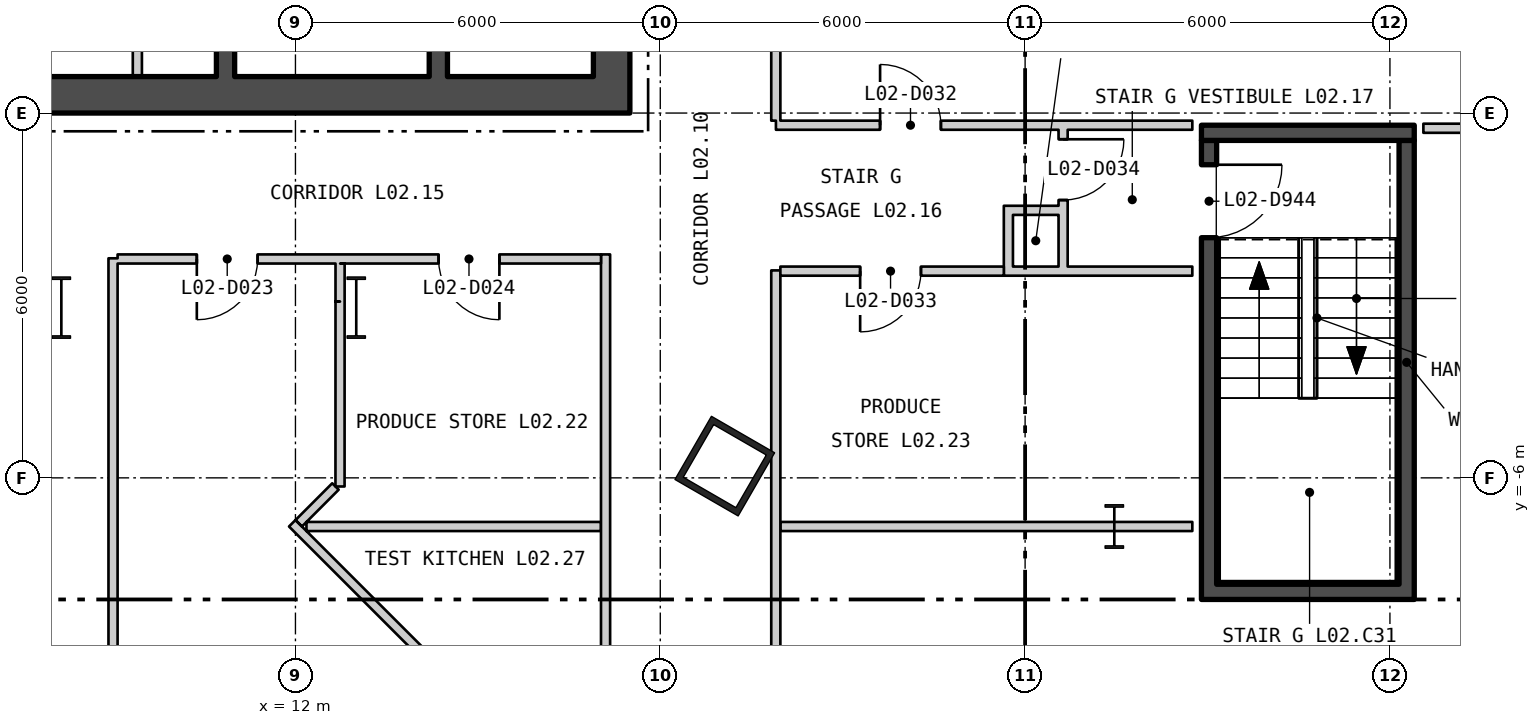
"""IFC4 building model, lengths in metres.
Left out: names, types, materials, properties, quantities, classifications, styles, units other than length and angle.
Written with IfcOpenShell. Run it as: python <this file> out.ifc"""

import sys

from ifc_helpers import new_model, si_unit, direction, frame, frame_2d, origin, origin_2d, place, context, subcontext, project, spatial, rectangle, hollow_rectangle, i_section, extrude, element, fill, save


model = new_model("IFC4")
c1 = context("Model", 3, precision=1e-05, world=origin(), true_north=direction((0.0, 1.0)))
c2 = subcontext(c1, "Body", "Model", "MODEL_VIEW")
j1 = project(units=[si_unit("LENGTHUNIT", "METRE"), si_unit("PLANEANGLEUNIT", "RADIAN")], contexts=[c1])
p1 = place(None, origin())
s1 = spatial("IfcSite", under=j1, at=p1, CompositionType="ELEMENT")
p2 = place(p1, origin())
s2 = spatial("IfcBuilding", under=s1, at=p2, CompositionType="ELEMENT")
p3 = place(p2, frame((0.0, 0.0, 13.5)))
s3 = spatial("IfcBuildingStorey", under=s2, at=p3, CompositionType="ELEMENT", Elevation=13.5)
p4 = place(p3, frame((19.061, -5.807, 0.0), z_axis=(0.0, 0.0, 1.0), x_axis=(0.5, 0.866025403784, 0.0)))
e1 = element("IfcColumn", 1, at=p4, inside=s3, PredefinedType="COLUMN", context=c2, shape_type="SweptSolid", body=[
    extrude(hollow_rectangle(XDim=1.2, YDim=1.2, WallThickness=0.1, at=origin_2d()), origin(), (0.0, 0.0, 1.0), 5.1),
])
for number, where, z_axis, x_axis in (
    (2, (8.15, -3.2, 0.0), (0.0, 0.0, 1.0), (1.0, 0.0, 0.0)),
    (3, (13.0, -3.2, 0.0), (0.0, 0.0, 1.0), (1.0, 0.0, 0.0)),
):
    element("IfcColumn", number, at=place(p3, frame(where, z_axis=z_axis, x_axis=x_axis)), inside=s3, PredefinedType="COLUMN", context=c2, shape_type="SweptSolid", body=[
        extrude(i_section(OverallWidth=0.302, OverallDepth=1.008, WebThickness=0.021, FlangeThickness=0.04, at=origin_2d()), origin(), (0.0, 0.0, 1.0), 5.1),
    ])
p5 = place(p3, frame((25.467, -6.8, 0.0), z_axis=(0.0, 0.0, 1.0), x_axis=(1.0, 0.0, 0.0)))
e4 = element("IfcColumn", 4, at=p5, inside=s3, PredefinedType="COLUMN", context=c2, shape_type="SweptSolid", body=[
    extrude(i_section(OverallWidth=0.304, OverallDepth=0.716, WebThickness=0.021, FlangeThickness=0.04, at=origin_2d()), origin(), (0.0, 0.0, 1.0), 5.1),
])
p6 = place(p3, frame((-17.5, 0.3, 0.0), z_axis=(0.0, 0.0, 1.0), x_axis=(1.0, 0.0, 0.0)))
e5 = element("IfcWall", 5, at=p6, inside=s3, PredefinedType="SHEAR", context=c2, shape_type="SweptSolid", body=[
    extrude(rectangle(XDim=35.0, YDim=0.6, at=frame_2d((17.5, 0.0))), origin(), (0.0, 0.0, 1.0), 4.88),
])
p7 = place(p6, frame((12.0, 0.0, 0.0)))
e6 = element("IfcOpeningElement", 6, at=p7, cuts=e5, PredefinedType="OPENING", context=c2, shape_type="SweptSolid", body=[
    extrude(rectangle(XDim=1.8, YDim=2.4, at=frame_2d((0.9, 1.2))), frame((0.0, 0.31, 0.0), z_axis=(0.0, -1.0, 0.0), x_axis=(1.0, 0.0, 0.0)), (0.0, 0.0, 1.0), 0.62),
])
p8 = place(p6, frame((22.0, 0.0, 0.0)))
e7 = element("IfcOpeningElement", 7, at=p8, cuts=e5, PredefinedType="OPENING", context=c2, shape_type="SweptSolid", body=[
    extrude(rectangle(XDim=1.8, YDim=2.4, at=frame_2d((0.9, 1.2))), frame((0.0, 0.31, 0.0), z_axis=(0.0, -1.0, 0.0), x_axis=(1.0, 0.0, 0.0)), (0.0, 0.0, 1.0), 0.62),
])
p9 = place(p3, frame((17.2, 0.6, 0.0), z_axis=(0.0, 0.0, 1.0), x_axis=(0.0, 1.0, 0.0)))
e8 = element("IfcWall", 8, at=p9, inside=s3, PredefinedType="SHEAR", context=c2, shape_type="SweptSolid", body=[
    extrude(rectangle(XDim=16.8, YDim=0.6, at=frame_2d((8.4, 0.0))), origin(), (0.0, 0.0, 1.0), 4.88),
])
p10 = place(p9, frame((5.7, 0.0, 0.0)))
e9 = element("IfcOpeningElement", 9, at=p10, cuts=e8, PredefinedType="OPENING", context=c2, shape_type="SweptSolid", body=[
    extrude(rectangle(XDim=1.5, YDim=2.1, at=frame_2d((0.75, 1.05))), frame((0.0, 0.31, 0.0), z_axis=(0.0, -1.0, 0.0), x_axis=(1.0, 0.0, 0.0)), (0.0, 0.0, 1.0), 0.62),
])
p11 = place(p9, frame((1.5, 0.0, 0.0)))
e10 = element("IfcOpeningElement", 10, at=p11, cuts=e8, PredefinedType="OPENING", context=c2, shape_type="SweptSolid", body=[
    extrude(rectangle(XDim=0.9, YDim=2.1, at=frame_2d((0.45, 1.05))), frame((0.0, 0.31, 0.0), z_axis=(0.0, -1.0, 0.0), x_axis=(1.0, 0.0, 0.0)), (0.0, 0.0, 1.0), 0.62),
])
p12 = place(p9, frame((4.3, 0.0, 0.0)))
e11 = element("IfcOpeningElement", 11, at=p12, cuts=e8, PredefinedType="OPENING", context=c2, shape_type="SweptSolid", body=[
    extrude(rectangle(XDim=1.0, YDim=2.1, at=frame_2d((0.5, 1.05))), frame((0.0, 0.31, 0.0), z_axis=(0.0, -1.0, 0.0), x_axis=(1.0, 0.0, 0.0)), (0.0, 0.0, 1.0), 0.62),
])
p13 = place(p9, frame((8.613, 0.0, 0.0)))
e12 = element("IfcOpeningElement", 12, at=p13, cuts=e8, PredefinedType="OPENING", context=c2, shape_type="SweptSolid", body=[
    extrude(rectangle(XDim=0.9, YDim=2.1, at=frame_2d((0.45, 1.05))), frame((0.0, 0.31, 0.0), z_axis=(0.0, -1.0, 0.0), x_axis=(1.0, 0.0, 0.0)), (0.0, 0.0, 1.0), 0.62),
])
p14 = place(p9, frame((13.413, 0.0, 0.0)))
e13 = element("IfcOpeningElement", 13, at=p14, cuts=e8, PredefinedType="OPENING", context=c2, shape_type="SweptSolid", body=[
    extrude(rectangle(XDim=0.9, YDim=2.1, at=frame_2d((0.45, 1.05))), frame((0.0, 0.31, 0.0), z_axis=(0.0, -1.0, 0.0), x_axis=(1.0, 0.0, 0.0)), (0.0, 0.0, 1.0), 0.62),
])
p15 = place(p3, frame((10.85, 0.6, 0.0), z_axis=(0.0, 0.0, 1.0), x_axis=(0.0, 1.0, 0.0)))
e14 = element("IfcWall", 14, at=p15, inside=s3, PredefinedType="SHEAR", context=c2, shape_type="SweptSolid", body=[
    extrude(rectangle(XDim=16.8, YDim=0.3, at=frame_2d((8.4, 0.0))), origin(), (0.0, 0.0, 1.0), 4.88),
])
p16 = place(p15, frame((5.075, 0.0, 0.0)))
e15 = element("IfcOpeningElement", 15, at=p16, cuts=e14, PredefinedType="OPENING", context=c2, shape_type="SweptSolid", body=[
    extrude(rectangle(XDim=1.25, YDim=2.1, at=frame_2d((0.625, 1.05))), frame((0.0, 0.16, 0.0), z_axis=(0.0, -1.0, 0.0), x_axis=(1.0, 0.0, 0.0)), (0.0, 0.0, 1.0), 0.32),
])
p17 = place(p15, frame((1.525, 0.0, 0.0)))
e16 = element("IfcOpeningElement", 16, at=p17, cuts=e14, PredefinedType="OPENING", context=c2, shape_type="SweptSolid", body=[
    extrude(rectangle(XDim=1.0, YDim=2.1, at=frame_2d((0.5, 1.05))), frame((0.0, 0.16, 0.0), z_axis=(0.0, -1.0, 0.0), x_axis=(1.0, 0.0, 0.0)), (0.0, 0.0, 1.0), 0.32),
])
p18 = place(p3, frame((14.35, 0.6, 0.0), z_axis=(0.0, 0.0, 1.0), x_axis=(0.0, 1.0, 0.0)))
e17 = element("IfcWall", 17, at=p18, inside=s3, PredefinedType="SHEAR", context=c2, shape_type="SweptSolid", body=[
    extrude(rectangle(XDim=16.8, YDim=0.3, at=frame_2d((8.4, 0.0))), origin(), (0.0, 0.0, 1.0), 4.88),
])
p19 = place(p18, frame((5.7, 0.0, 0.0)))
e18 = element("IfcOpeningElement", 18, at=p19, cuts=e17, PredefinedType="OPENING", context=c2, shape_type="SweptSolid", body=[
    extrude(rectangle(XDim=1.5, YDim=2.1, at=frame_2d((0.75, 1.05))), frame((0.0, 0.16, 0.0), z_axis=(0.0, -1.0, 0.0), x_axis=(1.0, 0.0, 0.0)), (0.0, 0.0, 1.0), 0.32),
])
p20 = place(p3, frame((9.4, 0.6, 0.0), z_axis=(0.0, 0.0, 1.0), x_axis=(0.0, 1.0, 0.0)))
e19 = element("IfcWall", 19, at=p20, inside=s3, PredefinedType="PARTITIONING", context=c2, shape_type="SweptSolid", body=[
    extrude(rectangle(XDim=3.275, YDim=0.15, at=frame_2d((1.637, 0.0))), origin(), (0.0, 0.0, 1.0), 4.88),
])
p21 = place(p3, frame((27.025, -7.75, 0.0), z_axis=(0.0, 0.0, 1.0), x_axis=(0.0, 1.0, 0.0)))
e20 = element("IfcWall", 20, at=p21, inside=s3, PredefinedType="SHEAR", context=c2, shape_type="SweptSolid", body=[
    extrude(rectangle(XDim=7.3, YDim=0.25, at=frame_2d((3.65, 0.0))), origin(), (0.0, 0.0, 1.0), 4.88),
])
p22 = place(p21, frame((5.7, 0.0, 0.0)))
e21 = element("IfcOpeningElement", 21, at=p22, cuts=e20, PredefinedType="OPENING", context=c2, shape_type="SweptSolid", body=[
    extrude(rectangle(XDim=1.2, YDim=2.1, at=frame_2d((0.6, 1.05))), frame((0.0, 0.135, 0.0), z_axis=(0.0, -1.0, 0.0), x_axis=(1.0, 0.0, 0.0)), (0.0, 0.0, 1.0), 0.27),
])
p23 = place(p3, frame((30.275, -7.75, 0.0), z_axis=(0.0, 0.0, 1.0), x_axis=(0.0, 1.0, 0.0)))
e22 = element("IfcWall", 22, at=p23, inside=s3, PredefinedType="SHEAR", context=c2, shape_type="SweptSolid", body=[
    extrude(rectangle(XDim=7.3, YDim=0.25, at=frame_2d((3.65, 0.0))), origin(), (0.0, 0.0, 1.0), 4.88),
])
for number, where, z_axis, x_axis in (
    (23, (26.9, -7.875, 0.0), (0.0, 0.0, 1.0), (1.0, 0.0, 0.0)),
    (24, (26.9, -0.325, 0.0), (0.0, 0.0, 1.0), (1.0, 0.0, 0.0)),
):
    element("IfcWall", number, at=place(p3, frame(where, z_axis=z_axis, x_axis=x_axis)), inside=s3, PredefinedType="SHEAR", context=c2, shape_type="SweptSolid", body=[
        extrude(rectangle(XDim=3.5, YDim=0.25, at=frame_2d((1.75, 0.0))), origin(), (0.0, 0.0, 1.0), 4.88),
    ])
p24 = place(p3, frame((9.0, -13.675, 0.0), z_axis=(0.0, 0.0, 1.0), x_axis=(0.0, 1.0, 0.0)))
e25 = element("IfcWall", 25, at=p24, inside=s3, PredefinedType="PARTITIONING", context=c2, shape_type="SweptSolid", body=[
    extrude(rectangle(XDim=11.286, YDim=0.15, at=frame_2d((5.643, 0.0))), origin(), (0.0, 0.0, 1.0), 4.88),
])
p25 = place(p3, frame((9.075, -2.4, 0.0), z_axis=(0.0, 0.0, 1.0), x_axis=(1.0, 0.0, 0.0)))
e26 = element("IfcWall", 26, at=p25, inside=s3, PredefinedType="PARTITIONING", context=c2, shape_type="SweptSolid", body=[
    extrude(rectangle(XDim=7.95, YDim=0.15, at=frame_2d((3.975, 0.0))), origin(), (0.0, 0.0, 1.0), 4.88),
])
p26 = place(p25, frame((1.303, 0.0, 0.0)))
e27 = element("IfcOpeningElement", 27, at=p26, cuts=e26, PredefinedType="OPENING", context=c2, shape_type="SweptSolid", body=[
    extrude(rectangle(XDim=1.0, YDim=2.1, at=frame_2d((0.5, 1.05))), frame((0.0, 0.085, 0.0), z_axis=(0.0, -1.0, 0.0), x_axis=(1.0, 0.0, 0.0)), (0.0, 0.0, 1.0), 0.17),
])
p27 = place(p25, frame((5.279, 0.0, 0.0)))
e28 = element("IfcOpeningElement", 28, at=p27, cuts=e26, PredefinedType="OPENING", context=c2, shape_type="SweptSolid", body=[
    extrude(rectangle(XDim=1.0, YDim=2.1, at=frame_2d((0.5, 1.05))), frame((0.0, 0.085, 0.0), z_axis=(0.0, -1.0, 0.0), x_axis=(1.0, 0.0, 0.0)), (0.0, 0.0, 1.0), 0.17),
])
p28 = place(p3, frame((11.947, -6.747, 0.0), z_axis=(0.0, 0.0, 1.0), x_axis=(0.707106781187, -0.707106781187, 0.0)))
e29 = element("IfcWall", 29, at=p28, inside=s3, PredefinedType="PARTITIONING", context=c2, shape_type="SweptSolid", body=[
    extrude(rectangle(XDim=7.106, YDim=0.15, at=frame_2d((3.553, 0.0))), origin(), (0.0, 0.0, 1.0), 4.88),
])
p29 = place(p3, frame((12.054, -6.747, 0.0), z_axis=(0.0, 0.0, 1.0), x_axis=(0.706521670373, 0.707691408238, 0.0)))
e30 = element("IfcWall", 30, at=p29, inside=s3, PredefinedType="PARTITIONING", context=c2, shape_type="SweptSolid", body=[
    extrude(rectangle(XDim=0.855, YDim=0.15, at=frame_2d((0.427, 0.0))), origin(), (0.0, 0.0, 1.0), 4.88),
])
p30 = place(p3, frame((12.181, -6.8, 0.0), z_axis=(0.0, 0.0, 1.0), x_axis=(1.0, 0.0, 0.0)))
e31 = element("IfcWall", 31, at=p30, inside=s3, PredefinedType="PARTITIONING", context=c2, shape_type="SweptSolid", body=[
    extrude(rectangle(XDim=4.844, YDim=0.15, at=frame_2d((2.422, 0.0))), origin(), (0.0, 0.0, 1.0), 4.88),
])
p31 = place(p3, frame((12.733, -6.142, 0.0), z_axis=(0.0, 0.0, 1.0), x_axis=(0.000262984869, 0.999999965419, 0.0)))
e32 = element("IfcWall", 32, at=p31, inside=s3, PredefinedType="PARTITIONING", context=c2, shape_type="SweptSolid", body=[
    extrude(rectangle(XDim=3.042, YDim=0.15, at=frame_2d((1.521, 0.0))), origin(), (0.0, 0.0, 1.0), 4.19),
])
p32 = place(p3, frame((12.734, -3.1, 0.0), z_axis=(0.0, 0.0, 1.0), x_axis=(0.000319999984, 0.9999999488, 0.0)))
e33 = element("IfcWall", 33, at=p32, inside=s3, PredefinedType="PARTITIONING", context=c2, shape_type="SweptSolid", body=[
    extrude(rectangle(XDim=0.625, YDim=0.15, at=frame_2d((0.312, 0.0))), origin(), (0.0, 0.0, 1.0), 4.28),
])
p33 = place(p3, frame((17.1, -11.9, 0.0), z_axis=(0.0, 0.0, 1.0), x_axis=(0.0, 1.0, 0.0)))
e34 = element("IfcWall", 34, at=p33, inside=s3, PredefinedType="PARTITIONING", context=c2, shape_type="SweptSolid", body=[
    extrude(rectangle(XDim=9.575, YDim=0.15, at=frame_2d((4.787, 0.0))), origin(), (0.0, 0.0, 1.0), 4.88),
])
p34 = place(p33, frame((2.0, 0.0, 0.0)))
e35 = element("IfcOpeningElement", 35, at=p34, cuts=e34, PredefinedType="OPENING", context=c2, shape_type="SweptSolid", body=[
    extrude(rectangle(XDim=1.0, YDim=2.1, at=frame_2d((0.5, 1.05))), frame((0.0, 0.085, 0.0), z_axis=(0.0, -1.0, 0.0), x_axis=(1.0, 0.0, 0.0)), (0.0, 0.0, 1.0), 0.17),
])
p35 = place(p3, frame((19.9, -23.775, 0.0), z_axis=(0.0, 0.0, 1.0), x_axis=(0.0, 1.0, 0.0)))
e36 = element("IfcWall", 36, at=p35, inside=s3, PredefinedType="PARTITIONING", context=c2, shape_type="SweptSolid", body=[
    extrude(rectangle(XDim=21.187, YDim=0.15, at=frame_2d((10.594, 0.0))), origin(), (0.0, 0.0, 1.0), 4.88),
])
p36 = place(p35, frame((2.643, 0.0, 0.0)))
e37 = element("IfcOpeningElement", 37, at=p36, cuts=e36, PredefinedType="OPENING", context=c2, shape_type="SweptSolid", body=[
    extrude(rectangle(XDim=1.8, YDim=2.1, at=frame_2d((0.9, 1.05))), frame((0.0, 0.085, 0.0), z_axis=(0.0, -1.0, 0.0), x_axis=(1.0, 0.0, 0.0)), (0.0, 0.0, 1.0), 0.17),
])
p37 = place(p35, frame((11.998, 0.0, 0.0)))
e38 = element("IfcOpeningElement", 38, at=p37, cuts=e36, PredefinedType="OPENING", context=c2, shape_type="SweptSolid", body=[
    extrude(rectangle(XDim=1.8, YDim=2.1, at=frame_2d((0.9, 1.05))), frame((0.0, 0.085, 0.0), z_axis=(0.0, -1.0, 0.0), x_axis=(1.0, 0.0, 0.0)), (0.0, 0.0, 1.0), 0.17),
])
p38 = place(p3, frame((19.9, -0.125, 0.0), z_axis=(0.0, 0.0, 1.0), x_axis=(0.0, 1.0, 0.0)))
e39 = element("IfcWall", 39, at=p38, inside=s3, PredefinedType="PARTITIONING", context=c2, shape_type="SweptSolid", body=[
    extrude(rectangle(XDim=1.15, YDim=0.15, at=frame_2d((0.575, 0.0))), origin(), (0.0, 0.0, 1.0), 4.88),
])
p39 = place(p3, frame((19.902, -0.2, 0.0), z_axis=(0.0, 0.0, 1.0), x_axis=(1.0, 0.0, 0.0)))
e40 = element("IfcWall", 40, at=p39, inside=s3, PredefinedType="PARTITIONING", context=c2, shape_type="SweptSolid", body=[
    extrude(rectangle(XDim=6.848, YDim=0.15, at=frame_2d((3.424, 0.0))), origin(), (0.0, 0.0, 1.0), 4.88),
])
p40 = place(p39, frame((1.713, 0.0, 0.0)))
e41 = element("IfcOpeningElement", 41, at=p40, cuts=e40, PredefinedType="OPENING", context=c2, shape_type="SweptSolid", body=[
    extrude(rectangle(XDim=1.0, YDim=2.1, at=frame_2d((0.5, 1.05))), frame((0.0, 0.085, 0.0), z_axis=(0.0, -1.0, 0.0), x_axis=(1.0, 0.0, 0.0)), (0.0, 0.0, 1.0), 0.17),
])
p41 = place(p3, frame((19.975, -6.8, 0.0), z_axis=(0.0, 0.0, 1.0), x_axis=(1.0, 0.0, 0.0)))
e42 = element("IfcWall", 42, at=p41, inside=s3, PredefinedType="PARTITIONING", context=c2, shape_type="SweptSolid", body=[
    extrude(rectangle(XDim=6.775, YDim=0.15, at=frame_2d((3.388, 0.0))), origin(), (0.0, 0.0, 1.0), 4.09),
])
p42 = place(p3, frame((19.975, -2.6, 0.0), z_axis=(0.0, 0.0, 1.0), x_axis=(1.0, 0.0, 0.0)))
e43 = element("IfcWall", 43, at=p42, inside=s3, PredefinedType="PARTITIONING", context=c2, shape_type="SweptSolid", body=[
    extrude(rectangle(XDim=3.675, YDim=0.15, at=frame_2d((1.837, 0.0))), origin(), (0.0, 0.0, 1.0), 4.88),
])
p43 = place(p42, frame((1.312, 0.0, 0.0)))
e44 = element("IfcOpeningElement", 44, at=p43, cuts=e43, PredefinedType="OPENING", context=c2, shape_type="SweptSolid", body=[
    extrude(rectangle(XDim=1.0, YDim=2.1, at=frame_2d((0.5, 1.05))), frame((0.0, 0.085, 0.0), z_axis=(0.0, -1.0, 0.0), x_axis=(1.0, 0.0, 0.0)), (0.0, 0.0, 1.0), 0.17),
])
p44 = place(p3, frame((23.725, -2.675, 0.0), z_axis=(0.0, 0.0, 1.0), x_axis=(0.0, 1.0, 0.0)))
e45 = element("IfcWall", 45, at=p44, inside=s3, PredefinedType="PARTITIONING", context=c2, shape_type="SweptSolid", body=[
    extrude(rectangle(XDim=1.15, YDim=0.15, at=frame_2d((0.575, 0.0))), origin(), (0.0, 0.0, 1.0), 4.88),
])
for number, where, z_axis, x_axis in (
    (46, (23.8, -2.6, 0.0), (0.0, 0.0, 1.0), (1.0, 0.0, 0.0)),
    (47, (23.8, -1.6, 0.0), (0.0, 0.0, 1.0), (1.0, 0.0, 0.0)),
):
    element("IfcWall", number, at=place(p3, frame(where, z_axis=z_axis, x_axis=x_axis)), inside=s3, PredefinedType="PARTITIONING", context=c2, shape_type="SweptSolid", body=[
        extrude(rectangle(XDim=0.75, YDim=0.15, at=frame_2d((0.375, 0.0))), origin(), (0.0, 0.0, 1.0), 4.88),
    ])
p45 = place(p3, frame((24.625, -2.675, 0.0), z_axis=(0.0, 0.0, 1.0), x_axis=(0.0, 1.0, 0.0)))
e48 = element("IfcWall", 48, at=p45, inside=s3, PredefinedType="PARTITIONING", context=c2, shape_type="SweptSolid", body=[
    extrude(rectangle(XDim=1.087, YDim=0.15, at=frame_2d((0.543, 0.0))), origin(), (0.0, 0.0, 1.0), 4.88),
])
p46 = place(p3, frame((24.625, -1.588, 0.0), z_axis=(0.0, 0.0, 1.0), x_axis=(0.0, 1.0, 0.0)))
e49 = element("IfcWall", 49, at=p46, inside=s3, PredefinedType="PARTITIONING", context=c2, shape_type="SweptSolid", body=[
    extrude(rectangle(XDim=1.313, YDim=0.15, at=frame_2d((0.656, 0.0))), origin(), (0.0, 0.0, 1.0), 4.88),
])
p47 = place(p46, frame((0.157, 0.0, 0.0)))
e50 = element("IfcOpeningElement", 50, at=p47, cuts=e49, PredefinedType="OPENING", context=c2, shape_type="SweptSolid", body=[
    extrude(rectangle(XDim=1.0, YDim=2.1, at=frame_2d((0.5, 1.05))), frame((0.0, 0.085, 0.0), z_axis=(0.0, -1.0, 0.0), x_axis=(1.0, 0.0, 0.0)), (0.0, 0.0, 1.0), 0.17),
])
p48 = place(p3, frame((24.7, -2.6, 0.0), z_axis=(0.0, 0.0, 1.0), x_axis=(1.0, 0.0, 0.0)))
e51 = element("IfcWall", 51, at=p48, inside=s3, PredefinedType="PARTITIONING", context=c2, shape_type="SweptSolid", body=[
    extrude(rectangle(XDim=2.05, YDim=0.15, at=frame_2d((1.025, 0.0))), origin(), (0.0, 0.0, 1.0), 4.88),
])
p49 = place(p3, frame((30.55, -0.25, 0.0), z_axis=(0.0, 0.0, 1.0), x_axis=(1.0, 0.0, 0.0)))
e52 = element("IfcWall", 52, at=p49, inside=s3, PredefinedType="PARTITIONING", context=c2, shape_type="SweptSolid", body=[
    extrude(rectangle(XDim=7.55, YDim=0.15, at=frame_2d((3.775, 0.0))), origin(), (0.0, 0.0, 1.0), 4.88),
])
p50 = place(p22, origin())
e53 = element("IfcDoor", 53, at=p50, inside=s3, OperationType="SINGLE_SWING_RIGHT", PredefinedType="DOOR", context=c2, shape_type="SweptSolid", body=[
    extrude(rectangle(XDim=1.2, YDim=2.1, at=frame_2d((0.6, 1.05))), frame((0.0, 0.025, 0.0), z_axis=(0.0, -1.0, 0.0), x_axis=(1.0, 0.0, 0.0)), (0.0, 0.0, 1.0), 0.05),
])
fill(e21, e53)
p51 = place(p26, origin())
e54 = element("IfcDoor", 54, at=p51, inside=s3, OperationType="SINGLE_SWING_LEFT", PredefinedType="DOOR", context=c2, shape_type="SweptSolid", body=[
    extrude(rectangle(XDim=1.0, YDim=2.1, at=frame_2d((0.5, 1.05))), frame((0.0, 0.025, 0.0), z_axis=(0.0, -1.0, 0.0), x_axis=(1.0, 0.0, 0.0)), (0.0, 0.0, 1.0), 0.05),
])
fill(e27, e54)
p52 = place(p27, origin())
e55 = element("IfcDoor", 55, at=p52, inside=s3, OperationType="SINGLE_SWING_RIGHT", PredefinedType="DOOR", context=c2, shape_type="SweptSolid", body=[
    extrude(rectangle(XDim=1.0, YDim=2.1, at=frame_2d((0.5, 1.05))), frame((0.0, 0.025, 0.0), z_axis=(0.0, -1.0, 0.0), x_axis=(1.0, 0.0, 0.0)), (0.0, 0.0, 1.0), 0.05),
])
fill(e28, e55)
p53 = place(p40, origin())
e56 = element("IfcDoor", 56, at=p53, inside=s3, OperationType="SINGLE_SWING_RIGHT", PredefinedType="DOOR", context=c2, shape_type="SweptSolid", body=[
    extrude(rectangle(XDim=1.0, YDim=2.1, at=frame_2d((0.5, 1.05))), frame((0.0, 0.025, 0.0), z_axis=(0.0, -1.0, 0.0), x_axis=(1.0, 0.0, 0.0)), (0.0, 0.0, 1.0), 0.05),
])
fill(e41, e56)
p54 = place(p43, origin())
e57 = element("IfcDoor", 57, at=p54, inside=s3, OperationType="SINGLE_SWING_LEFT", PredefinedType="DOOR", context=c2, shape_type="SweptSolid", body=[
    extrude(rectangle(XDim=1.0, YDim=2.1, at=frame_2d((0.5, 1.05))), frame((0.0, 0.025, 0.0), z_axis=(0.0, -1.0, 0.0), x_axis=(1.0, 0.0, 0.0)), (0.0, 0.0, 1.0), 0.05),
])
fill(e44, e57)
p55 = place(p47, origin())
e58 = element("IfcDoor", 58, at=p55, inside=s3, OperationType="SINGLE_SWING_RIGHT", PredefinedType="DOOR", context=c2, shape_type="SweptSolid", body=[
    extrude(rectangle(XDim=1.0, YDim=2.1, at=frame_2d((0.5, 1.05))), frame((0.0, 0.025, 0.0), z_axis=(0.0, -1.0, 0.0), x_axis=(1.0, 0.0, 0.0)), (0.0, 0.0, 1.0), 0.05),
])
fill(e50, e58)
save(model, sys.argv[1])
